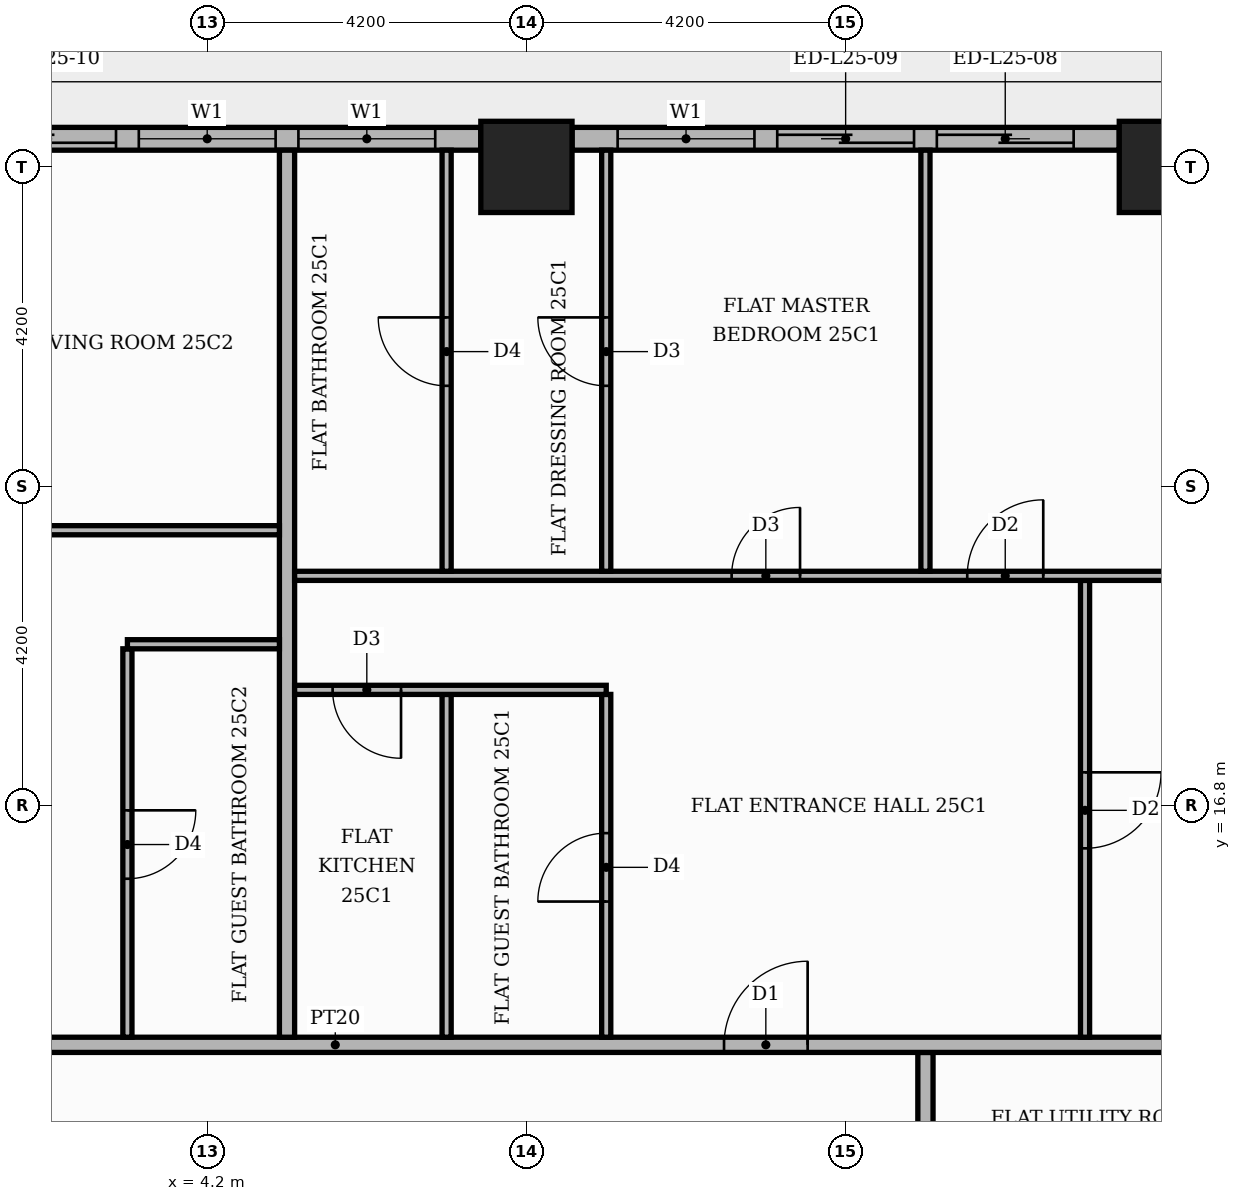
"""IFC4 building model, lengths in metres.
Left out: names, types, materials, properties, quantities, classifications, styles, units other than length and angle.
Written with IfcOpenShell. Run it as: python <this file> out.ifc"""

import sys

from ifc_helpers import new_model, si_unit, direction, frame, frame_2d, origin, origin_2d, place, context, subcontext, project, spatial, rectangle, extrude, element, fill, save


model = new_model("IFC4")
c1 = context("Model", 3, precision=1e-05, world=origin(), true_north=direction((0.0, 1.0)))
c2 = subcontext(c1, "Body", "Model", "MODEL_VIEW")
j1 = project(units=[si_unit("LENGTHUNIT", "METRE"), si_unit("PLANEANGLEUNIT", "RADIAN")], contexts=[c1])
p1 = place(None, origin())
s1 = spatial("IfcSite", under=j1, at=p1, CompositionType="ELEMENT")
p2 = place(p1, origin())
s2 = spatial("IfcBuilding", under=s1, at=p2, CompositionType="ELEMENT")
p3 = place(p2, frame((0.0, 0.0, 106.5)))
s3 = spatial("IfcBuildingStorey", under=s2, at=p3, CompositionType="ELEMENT", Elevation=106.5)
for number, where, z_axis, x_axis in (
    (1, (8.4, 25.2, 0.0), (0.0, 0.0, 1.0), (1.0, 0.0, 0.0)),
    (2, (16.8, 25.2, 0.0), (0.0, 0.0, 1.0), (1.0, 0.0, 0.0)),
):
    element("IfcColumn", number, at=place(p3, frame(where, z_axis=z_axis, x_axis=x_axis)), inside=s3, PredefinedType="COLUMN", context=c2, shape_type="SweptSolid", body=[
        extrude(rectangle(XDim=1.2, YDim=1.2, at=origin_2d()), origin(), (0.0, 0.0, 1.0), 3.9),
    ])
p4 = place(p3, frame((16.2, 25.57, 0.0), z_axis=(0.0, 0.0, 1.0), x_axis=(-1.0, 0.0, 0.0)))
e3 = element("IfcWall", 3, at=p4, inside=s3, PredefinedType="STANDARD", context=c2, shape_type="SweptSolid", body=[
    extrude(rectangle(XDim=7.2, YDim=0.3, at=frame_2d((3.6, 0.0))), origin(), (0.0, 0.0, 1.0), 3.48),
])
p5 = place(p4, frame((0.6, 0.0, 0.0)))
e4 = element("IfcOpeningElement", 4, at=p5, cuts=e3, PredefinedType="OPENING", context=c2, shape_type="SweptSolid", body=[
    extrude(rectangle(XDim=1.8, YDim=2.4, at=frame_2d((0.9, 1.2))), frame((0.0, 0.16, 0.0), z_axis=(0.0, -1.0, 0.0), x_axis=(1.0, 0.0, 0.0)), (0.0, 0.0, 1.0), 0.32),
])
p6 = place(p4, frame((2.7, 0.0, 0.0)))
e5 = element("IfcOpeningElement", 5, at=p6, cuts=e3, PredefinedType="OPENING", context=c2, shape_type="SweptSolid", body=[
    extrude(rectangle(XDim=1.8, YDim=2.4, at=frame_2d((0.9, 1.2))), frame((0.0, 0.16, 0.0), z_axis=(0.0, -1.0, 0.0), x_axis=(1.0, 0.0, 0.0)), (0.0, 0.0, 1.0), 0.32),
])
p7 = place(p4, frame((4.8, 0.0, 0.9)))
e6 = element("IfcOpeningElement", 6, at=p7, cuts=e3, PredefinedType="OPENING", context=c2, shape_type="SweptSolid", body=[
    extrude(rectangle(XDim=1.8, YDim=2.1, at=frame_2d((0.9, 1.05))), frame((0.0, 0.16, 0.0), z_axis=(0.0, -1.0, 0.0), x_axis=(1.0, 0.0, 0.0)), (0.0, 0.0, 1.0), 0.32),
])
p8 = place(p3, frame((7.8, 25.57, 0.0), z_axis=(0.0, 0.0, 1.0), x_axis=(-1.0, 0.0, 0.0)))
e7 = element("IfcWall", 7, at=p8, inside=s3, PredefinedType="STANDARD", context=c2, shape_type="SweptSolid", body=[
    extrude(rectangle(XDim=7.2, YDim=0.3, at=frame_2d((3.6, 0.0))), origin(), (0.0, 0.0, 1.0), 3.48),
])
p9 = place(p8, frame((0.6, 0.0, 0.9)))
e8 = element("IfcOpeningElement", 8, at=p9, cuts=e7, PredefinedType="OPENING", context=c2, shape_type="SweptSolid", body=[
    extrude(rectangle(XDim=1.8, YDim=2.1, at=frame_2d((0.9, 1.05))), frame((0.0, 0.16, 0.0), z_axis=(0.0, -1.0, 0.0), x_axis=(1.0, 0.0, 0.0)), (0.0, 0.0, 1.0), 0.32),
])
p10 = place(p8, frame((2.7, 0.0, 0.9)))
e9 = element("IfcOpeningElement", 9, at=p10, cuts=e7, PredefinedType="OPENING", context=c2, shape_type="SweptSolid", body=[
    extrude(rectangle(XDim=1.8, YDim=2.1, at=frame_2d((0.9, 1.05))), frame((0.0, 0.16, 0.0), z_axis=(0.0, -1.0, 0.0), x_axis=(1.0, 0.0, 0.0)), (0.0, 0.0, 1.0), 0.32),
])
p11 = place(p8, frame((4.8, 0.0, 0.0)))
e10 = element("IfcOpeningElement", 10, at=p11, cuts=e7, PredefinedType="OPENING", context=c2, shape_type="SweptSolid", body=[
    extrude(rectangle(XDim=1.8, YDim=2.4, at=frame_2d((0.9, 1.2))), frame((0.0, 0.16, 0.0), z_axis=(0.0, -1.0, 0.0), x_axis=(1.0, 0.0, 0.0)), (0.0, 0.0, 1.0), 0.32),
])
p12 = place(p3, frame((13.65, -5.15, 0.0), z_axis=(0.0, 0.0, 1.0), x_axis=(0.0, 1.0, 0.0)))
e11 = element("IfcWall", 11, at=p12, inside=s3, PredefinedType="PARTITIONING", context=c2, shape_type="SweptSolid", body=[
    extrude(rectangle(XDim=18.7, YDim=0.2, at=frame_2d((9.35, 0.0))), origin(), (0.0, 0.0, 1.0), 3.48),
])
p13 = place(p12, frame((5.65, 0.0, 0.0)))
e12 = element("IfcOpeningElement", 12, at=p13, cuts=e11, PredefinedType="OPENING", context=c2, shape_type="SweptSolid", body=[
    extrude(rectangle(XDim=1.1, YDim=2.4, at=frame_2d((0.55, 1.2))), frame((0.0, 0.11, 0.0), z_axis=(0.0, -1.0, 0.0), x_axis=(1.0, 0.0, 0.0)), (0.0, 0.0, 1.0), 0.22),
])
p14 = place(p3, frame((-13.65, 13.65, 0.0), z_axis=(0.0, 0.0, 1.0), x_axis=(1.0, 0.0, 0.0)))
e13 = element("IfcWall", 13, at=p14, inside=s3, PredefinedType="PARTITIONING", context=c2, shape_type="SweptSolid", body=[
    extrude(rectangle(XDim=39.07, YDim=0.2, at=frame_2d((19.535, 0.0))), origin(), (0.0, 0.0, 1.0), 3.48),
])
p15 = place(p14, frame((24.65, 0.0, 0.0)))
e14 = element("IfcOpeningElement", 14, at=p15, cuts=e13, PredefinedType="OPENING", context=c2, shape_type="SweptSolid", body=[
    extrude(rectangle(XDim=1.1, YDim=2.4, at=frame_2d((0.55, 1.2))), frame((0.0, 0.11, 0.0), z_axis=(0.0, -1.0, 0.0), x_axis=(1.0, 0.0, 0.0)), (0.0, 0.0, 1.0), 0.22),
])
p16 = place(p14, frame((14.15, 0.0, 0.0)))
e15 = element("IfcOpeningElement", 15, at=p16, cuts=e13, PredefinedType="OPENING", context=c2, shape_type="SweptSolid", body=[
    extrude(rectangle(XDim=1.1, YDim=2.4, at=frame_2d((0.55, 1.2))), frame((0.0, 0.11, 0.0), z_axis=(0.0, -1.0, 0.0), x_axis=(1.0, 0.0, 0.0)), (0.0, 0.0, 1.0), 0.22),
])
p17 = place(p3, frame((3.15, 13.75, 0.0), z_axis=(0.0, 0.0, 1.0), x_axis=(0.0, 1.0, 0.0)))
e16 = element("IfcWall", 16, at=p17, inside=s3, PredefinedType="PARTITIONING", context=c2, shape_type="SweptSolid", body=[
    extrude(rectangle(XDim=5.11, YDim=0.12, at=frame_2d((2.555, 0.0))), origin(), (0.0, 0.0, 1.0), 3.48),
])
p18 = place(p17, frame((2.085, 0.0, 0.0)))
e17 = element("IfcOpeningElement", 17, at=p18, cuts=e16, PredefinedType="OPENING", context=c2, shape_type="SweptSolid", body=[
    extrude(rectangle(XDim=0.9, YDim=2.1, at=frame_2d((0.45, 1.05))), frame((0.0, 0.07, 0.0), z_axis=(0.0, -1.0, 0.0), x_axis=(1.0, 0.0, 0.0)), (0.0, 0.0, 1.0), 0.14),
])
p19 = place(p3, frame((5.25, 13.75, 0.0), z_axis=(0.0, 0.0, 1.0), x_axis=(0.0, 1.0, 0.0)))
e18 = element("IfcWall", 18, at=p19, inside=s3, PredefinedType="PARTITIONING", context=c2, shape_type="SweptSolid", body=[
    extrude(rectangle(XDim=11.67, YDim=0.2, at=frame_2d((5.835, 0.0))), origin(), (0.0, 0.0, 1.0), 3.48),
])
p20 = place(p3, frame((7.35, 13.75, 0.0), z_axis=(0.0, 0.0, 1.0), x_axis=(0.0, 1.0, 0.0)))
e19 = element("IfcWall", 19, at=p20, inside=s3, PredefinedType="PARTITIONING", context=c2, shape_type="SweptSolid", body=[
    extrude(rectangle(XDim=4.51, YDim=0.12, at=frame_2d((2.255, 0.0))), origin(), (0.0, 0.0, 1.0), 3.48),
])
p21 = place(p3, frame((9.45, 13.75, 0.0), z_axis=(0.0, 0.0, 1.0), x_axis=(0.0, 1.0, 0.0)))
e20 = element("IfcWall", 20, at=p21, inside=s3, PredefinedType="PARTITIONING", context=c2, shape_type="SweptSolid", body=[
    extrude(rectangle(XDim=4.51, YDim=0.12, at=frame_2d((2.255, 0.0))), origin(), (0.0, 0.0, 1.0), 3.48),
])
p22 = place(p21, frame((1.785, 0.0, 0.0)))
e21 = element("IfcOpeningElement", 21, at=p22, cuts=e20, PredefinedType="OPENING", context=c2, shape_type="SweptSolid", body=[
    extrude(rectangle(XDim=0.9, YDim=2.1, at=frame_2d((0.45, 1.05))), frame((0.0, 0.07, 0.0), z_axis=(0.0, -1.0, 0.0), x_axis=(1.0, 0.0, 0.0)), (0.0, 0.0, 1.0), 0.14),
])
p23 = place(p3, frame((15.75, 13.75, 0.0), z_axis=(0.0, 0.0, 1.0), x_axis=(0.0, 1.0, 0.0)))
e22 = element("IfcWall", 22, at=p23, inside=s3, PredefinedType="PARTITIONING", context=c2, shape_type="SweptSolid", body=[
    extrude(rectangle(XDim=6.01, YDim=0.12, at=frame_2d((3.005, 0.0))), origin(), (0.0, 0.0, 1.0), 3.48),
])
p24 = place(p23, frame((2.485, 0.0, 0.0)))
e23 = element("IfcOpeningElement", 23, at=p24, cuts=e22, PredefinedType="OPENING", context=c2, shape_type="SweptSolid", body=[
    extrude(rectangle(XDim=1.0, YDim=2.1, at=frame_2d((0.5, 1.05))), frame((0.0, 0.07, 0.0), z_axis=(0.0, -1.0, 0.0), x_axis=(1.0, 0.0, 0.0)), (0.0, 0.0, 1.0), 0.14),
])
p25 = place(p3, frame((5.35, 18.32, 0.0), z_axis=(0.0, 0.0, 1.0), x_axis=(1.0, 0.0, 0.0)))
e24 = element("IfcWall", 24, at=p25, inside=s3, PredefinedType="PARTITIONING", context=c2, shape_type="SweptSolid", body=[
    extrude(rectangle(XDim=4.1, YDim=0.12, at=frame_2d((2.05, 0.0))), origin(), (0.0, 0.0, 1.0), 3.48),
])
p26 = place(p25, frame((0.5, 0.0, 0.0)))
e25 = element("IfcOpeningElement", 25, at=p26, cuts=e24, PredefinedType="OPENING", context=c2, shape_type="SweptSolid", body=[
    extrude(rectangle(XDim=0.9, YDim=2.1, at=frame_2d((0.45, 1.05))), frame((0.0, 0.07, 0.0), z_axis=(0.0, -1.0, 0.0), x_axis=(1.0, 0.0, 0.0)), (0.0, 0.0, 1.0), 0.14),
])
p27 = place(p3, frame((3.15, 18.92, 0.0), z_axis=(0.0, 0.0, 1.0), x_axis=(1.0, 0.0, 0.0)))
e26 = element("IfcWall", 26, at=p27, inside=s3, PredefinedType="PARTITIONING", context=c2, shape_type="SweptSolid", body=[
    extrude(rectangle(XDim=2.0, YDim=0.12, at=frame_2d((1.0, 0.0))), origin(), (0.0, 0.0, 1.0), 3.48),
])
p28 = place(p3, frame((5.35, 19.82, 0.0), z_axis=(0.0, 0.0, 1.0), x_axis=(1.0, 0.0, 0.0)))
e27 = element("IfcWall", 27, at=p28, inside=s3, PredefinedType="PARTITIONING", context=c2, shape_type="SweptSolid", body=[
    extrude(rectangle(XDim=12.05, YDim=0.12, at=frame_2d((6.025, 0.0))), origin(), (0.0, 0.0, 1.0), 3.48),
])
p29 = place(p28, frame((8.85, 0.0, 0.0)))
e28 = element("IfcOpeningElement", 28, at=p29, cuts=e27, PredefinedType="OPENING", context=c2, shape_type="SweptSolid", body=[
    extrude(rectangle(XDim=1.0, YDim=2.1, at=frame_2d((0.5, 1.05))), frame((0.0, 0.07, 0.0), z_axis=(0.0, -1.0, 0.0), x_axis=(1.0, 0.0, 0.0)), (0.0, 0.0, 1.0), 0.14),
])
p30 = place(p28, frame((5.75, 0.0, 0.0)))
e29 = element("IfcOpeningElement", 29, at=p30, cuts=e27, PredefinedType="OPENING", context=c2, shape_type="SweptSolid", body=[
    extrude(rectangle(XDim=0.9, YDim=2.1, at=frame_2d((0.45, 1.05))), frame((0.0, 0.07, 0.0), z_axis=(0.0, -1.0, 0.0), x_axis=(1.0, 0.0, 0.0)), (0.0, 0.0, 1.0), 0.14),
])
p31 = place(p3, frame((7.35, 19.88, 0.0), z_axis=(0.0, 0.0, 1.0), x_axis=(0.0, 1.0, 0.0)))
e30 = element("IfcWall", 30, at=p31, inside=s3, PredefinedType="PARTITIONING", context=c2, shape_type="SweptSolid", body=[
    extrude(rectangle(XDim=5.54, YDim=0.12, at=frame_2d((2.77, 0.0))), origin(), (0.0, 0.0, 1.0), 3.48),
])
p32 = place(p31, frame((2.44, 0.0, 0.0)))
e31 = element("IfcOpeningElement", 31, at=p32, cuts=e30, PredefinedType="OPENING", context=c2, shape_type="SweptSolid", body=[
    extrude(rectangle(XDim=0.9, YDim=2.1, at=frame_2d((0.45, 1.05))), frame((0.0, 0.07, 0.0), z_axis=(0.0, -1.0, 0.0), x_axis=(1.0, 0.0, 0.0)), (0.0, 0.0, 1.0), 0.14),
])
p33 = place(p3, frame((9.45, 19.88, 0.0), z_axis=(0.0, 0.0, 1.0), x_axis=(0.0, 1.0, 0.0)))
e32 = element("IfcWall", 32, at=p33, inside=s3, PredefinedType="PARTITIONING", context=c2, shape_type="SweptSolid", body=[
    extrude(rectangle(XDim=5.54, YDim=0.12, at=frame_2d((2.77, 0.0))), origin(), (0.0, 0.0, 1.0), 3.48),
])
p34 = place(p33, frame((2.44, 0.0, 0.0)))
e33 = element("IfcOpeningElement", 33, at=p34, cuts=e32, PredefinedType="OPENING", context=c2, shape_type="SweptSolid", body=[
    extrude(rectangle(XDim=0.9, YDim=2.1, at=frame_2d((0.45, 1.05))), frame((0.0, 0.07, 0.0), z_axis=(0.0, -1.0, 0.0), x_axis=(1.0, 0.0, 0.0)), (0.0, 0.0, 1.0), 0.14),
])
p35 = place(p3, frame((13.65, 19.88, 0.0), z_axis=(0.0, 0.0, 1.0), x_axis=(0.0, 1.0, 0.0)))
e34 = element("IfcWall", 34, at=p35, inside=s3, PredefinedType="PARTITIONING", context=c2, shape_type="SweptSolid", body=[
    extrude(rectangle(XDim=5.54, YDim=0.12, at=frame_2d((2.77, 0.0))), origin(), (0.0, 0.0, 1.0), 3.48),
])
p36 = place(p3, frame((-13.55, 20.42, 0.0), z_axis=(0.0, 0.0, 1.0), x_axis=(1.0, 0.0, 0.0)))
e35 = element("IfcWall", 35, at=p36, inside=s3, PredefinedType="PARTITIONING", context=c2, shape_type="SweptSolid", body=[
    extrude(rectangle(XDim=18.7, YDim=0.12, at=frame_2d((9.35, 0.0))), origin(), (0.0, 0.0, 1.0), 3.48),
])
p37 = place(p36, frame((14.1, 0.0, 0.0)))
e36 = element("IfcOpeningElement", 36, at=p37, cuts=e35, PredefinedType="OPENING", context=c2, shape_type="SweptSolid", body=[
    extrude(rectangle(XDim=1.0, YDim=2.1, at=frame_2d((0.5, 1.05))), frame((0.0, 0.07, 0.0), z_axis=(0.0, -1.0, 0.0), x_axis=(1.0, 0.0, 0.0)), (0.0, 0.0, 1.0), 0.14),
])
p38 = place(p36, frame((6.8, 0.0, 0.0)))
e37 = element("IfcOpeningElement", 37, at=p38, cuts=e35, PredefinedType="OPENING", context=c2, shape_type="SweptSolid", body=[
    extrude(rectangle(XDim=0.9, YDim=2.1, at=frame_2d((0.45, 1.05))), frame((0.0, 0.07, 0.0), z_axis=(0.0, -1.0, 0.0), x_axis=(1.0, 0.0, 0.0)), (0.0, 0.0, 1.0), 0.14),
])
p39 = place(p5, origin())
e38 = element("IfcDoor", 38, at=p39, inside=s3, OperationType="SLIDING_TO_LEFT", PredefinedType="DOOR", context=c2, shape_type="SweptSolid", body=[
    extrude(rectangle(XDim=1.8, YDim=2.4, at=frame_2d((0.9, 1.2))), frame((0.0, 0.025, 0.0), z_axis=(0.0, -1.0, 0.0), x_axis=(1.0, 0.0, 0.0)), (0.0, 0.0, 1.0), 0.05),
])
fill(e4, e38)
p40 = place(p6, origin())
e39 = element("IfcDoor", 39, at=p40, inside=s3, OperationType="SLIDING_TO_RIGHT", PredefinedType="DOOR", context=c2, shape_type="SweptSolid", body=[
    extrude(rectangle(XDim=1.8, YDim=2.4, at=frame_2d((0.9, 1.2))), frame((0.0, 0.025, 0.0), z_axis=(0.0, -1.0, 0.0), x_axis=(1.0, 0.0, 0.0)), (0.0, 0.0, 1.0), 0.05),
])
fill(e5, e39)
p41 = place(p7, origin())
e40 = element("IfcWindow", 40, at=p41, inside=s3, PartitioningType="SINGLE_PANEL", PredefinedType="WINDOW", context=c2, shape_type="SweptSolid", body=[
    extrude(rectangle(XDim=1.8, YDim=2.1, at=frame_2d((0.9, 1.05))), frame((0.0, 0.03, 0.0), z_axis=(0.0, -1.0, 0.0), x_axis=(1.0, 0.0, 0.0)), (0.0, 0.0, 1.0), 0.06),
])
fill(e6, e40)
p42 = place(p9, origin())
e41 = element("IfcWindow", 41, at=p42, inside=s3, PartitioningType="SINGLE_PANEL", PredefinedType="WINDOW", context=c2, shape_type="SweptSolid", body=[
    extrude(rectangle(XDim=1.8, YDim=2.1, at=frame_2d((0.9, 1.05))), frame((0.0, 0.03, 0.0), z_axis=(0.0, -1.0, 0.0), x_axis=(1.0, 0.0, 0.0)), (0.0, 0.0, 1.0), 0.06),
])
fill(e8, e41)
p43 = place(p10, origin())
e42 = element("IfcWindow", 42, at=p43, inside=s3, PartitioningType="SINGLE_PANEL", PredefinedType="WINDOW", context=c2, shape_type="SweptSolid", body=[
    extrude(rectangle(XDim=1.8, YDim=2.1, at=frame_2d((0.9, 1.05))), frame((0.0, 0.03, 0.0), z_axis=(0.0, -1.0, 0.0), x_axis=(1.0, 0.0, 0.0)), (0.0, 0.0, 1.0), 0.06),
])
fill(e9, e42)
p44 = place(p11, origin())
e43 = element("IfcDoor", 43, at=p44, inside=s3, OperationType="SLIDING_TO_RIGHT", PredefinedType="DOOR", context=c2, shape_type="SweptSolid", body=[
    extrude(rectangle(XDim=1.8, YDim=2.4, at=frame_2d((0.9, 1.2))), frame((0.0, 0.025, 0.0), z_axis=(0.0, -1.0, 0.0), x_axis=(1.0, 0.0, 0.0)), (0.0, 0.0, 1.0), 0.05),
])
fill(e10, e43)
p45 = place(p15, origin())
e44 = element("IfcDoor", 44, at=p45, inside=s3, OperationType="SINGLE_SWING_RIGHT", PredefinedType="DOOR", context=c2, shape_type="SweptSolid", body=[
    extrude(rectangle(XDim=1.1, YDim=2.4, at=frame_2d((0.55, 1.2))), frame((0.0, 0.025, 0.0), z_axis=(0.0, -1.0, 0.0), x_axis=(1.0, 0.0, 0.0)), (0.0, 0.0, 1.0), 0.05),
])
fill(e14, e44)
p46 = place(p24, frame((1.0, 0.0, 0.0), z_axis=(0.0, 0.0, 1.0), x_axis=(-1.0, 0.0, 0.0)))
e45 = element("IfcDoor", 45, at=p46, inside=s3, OperationType="SINGLE_SWING_RIGHT", PredefinedType="DOOR", context=c2, shape_type="SweptSolid", body=[
    extrude(rectangle(XDim=1.0, YDim=2.1, at=frame_2d((0.5, 1.05))), frame((0.0, 0.025, 0.0), z_axis=(0.0, -1.0, 0.0), x_axis=(1.0, 0.0, 0.0)), (0.0, 0.0, 1.0), 0.05),
])
fill(e23, e45)
p47 = place(p22, origin())
e46 = element("IfcDoor", 46, at=p47, inside=s3, OperationType="SINGLE_SWING_LEFT", PredefinedType="DOOR", context=c2, shape_type="SweptSolid", body=[
    extrude(rectangle(XDim=0.9, YDim=2.1, at=frame_2d((0.45, 1.05))), frame((0.0, 0.025, 0.0), z_axis=(0.0, -1.0, 0.0), x_axis=(1.0, 0.0, 0.0)), (0.0, 0.0, 1.0), 0.05),
])
fill(e21, e46)
p48 = place(p26, frame((0.9, 0.0, 0.0), z_axis=(0.0, 0.0, 1.0), x_axis=(-1.0, 0.0, 0.0)))
e47 = element("IfcDoor", 47, at=p48, inside=s3, OperationType="SINGLE_SWING_RIGHT", PredefinedType="DOOR", context=c2, shape_type="SweptSolid", body=[
    extrude(rectangle(XDim=0.9, YDim=2.1, at=frame_2d((0.45, 1.05))), frame((0.0, 0.025, 0.0), z_axis=(0.0, -1.0, 0.0), x_axis=(1.0, 0.0, 0.0)), (0.0, 0.0, 1.0), 0.05),
])
fill(e25, e47)
p49 = place(p29, origin())
e48 = element("IfcDoor", 48, at=p49, inside=s3, OperationType="SINGLE_SWING_RIGHT", PredefinedType="DOOR", context=c2, shape_type="SweptSolid", body=[
    extrude(rectangle(XDim=1.0, YDim=2.1, at=frame_2d((0.5, 1.05))), frame((0.0, 0.025, 0.0), z_axis=(0.0, -1.0, 0.0), x_axis=(1.0, 0.0, 0.0)), (0.0, 0.0, 1.0), 0.05),
])
fill(e28, e48)
p50 = place(p30, origin())
e49 = element("IfcDoor", 49, at=p50, inside=s3, OperationType="SINGLE_SWING_RIGHT", PredefinedType="DOOR", context=c2, shape_type="SweptSolid", body=[
    extrude(rectangle(XDim=0.9, YDim=2.1, at=frame_2d((0.45, 1.05))), frame((0.0, 0.025, 0.0), z_axis=(0.0, -1.0, 0.0), x_axis=(1.0, 0.0, 0.0)), (0.0, 0.0, 1.0), 0.05),
])
fill(e29, e49)
p51 = place(p34, origin())
e50 = element("IfcDoor", 50, at=p51, inside=s3, OperationType="SINGLE_SWING_RIGHT", PredefinedType="DOOR", context=c2, shape_type="SweptSolid", body=[
    extrude(rectangle(XDim=0.9, YDim=2.1, at=frame_2d((0.45, 1.05))), frame((0.0, 0.025, 0.0), z_axis=(0.0, -1.0, 0.0), x_axis=(1.0, 0.0, 0.0)), (0.0, 0.0, 1.0), 0.05),
])
fill(e33, e50)
p52 = place(p32, origin())
e51 = element("IfcDoor", 51, at=p52, inside=s3, OperationType="SINGLE_SWING_RIGHT", PredefinedType="DOOR", context=c2, shape_type="SweptSolid", body=[
    extrude(rectangle(XDim=0.9, YDim=2.1, at=frame_2d((0.45, 1.05))), frame((0.0, 0.025, 0.0), z_axis=(0.0, -1.0, 0.0), x_axis=(1.0, 0.0, 0.0)), (0.0, 0.0, 1.0), 0.05),
])
fill(e31, e51)
p53 = place(p18, frame((0.9, 0.0, 0.0), z_axis=(0.0, 0.0, 1.0), x_axis=(-1.0, 0.0, 0.0)))
e52 = element("IfcDoor", 52, at=p53, inside=s3, OperationType="SINGLE_SWING_RIGHT", PredefinedType="DOOR", context=c2, shape_type="SweptSolid", body=[
    extrude(rectangle(XDim=0.9, YDim=2.1, at=frame_2d((0.45, 1.05))), frame((0.0, 0.025, 0.0), z_axis=(0.0, -1.0, 0.0), x_axis=(1.0, 0.0, 0.0)), (0.0, 0.0, 1.0), 0.05),
])
fill(e17, e52)
save(model, sys.argv[1])
